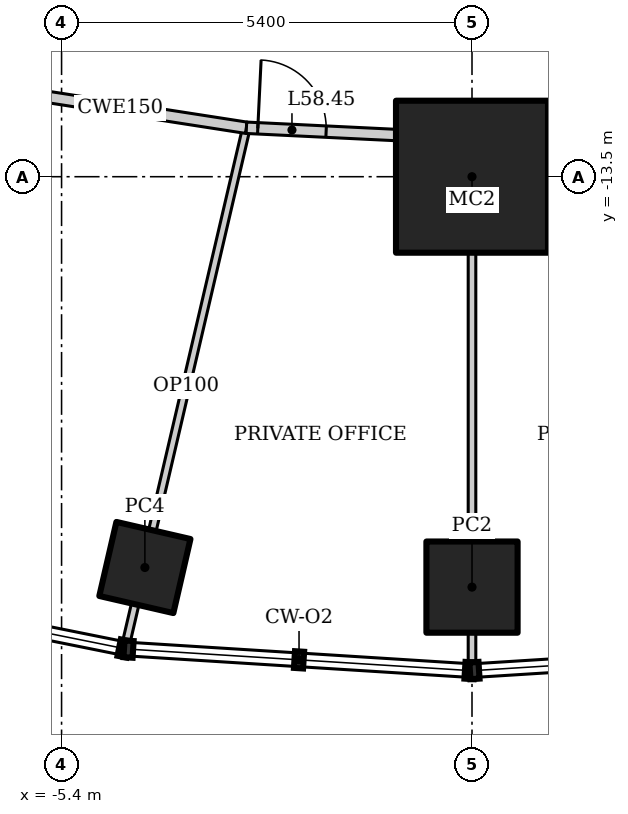
"""IFC4 building model, lengths in metres.
Left out: names, types, materials, properties, quantities, classifications, styles, units other than length and angle.
Written with IfcOpenShell. Run it as: python <this file> out.ifc"""

import sys

from ifc_helpers import new_model, si_unit, direction, frame, frame_2d, origin, origin_2d, place, context, subcontext, project, spatial, rectangle, hollow_rectangle, extrude, element, fill, save


model = new_model("IFC4")
c1 = context("Model", 3, precision=1e-05, world=origin(), true_north=direction((0.0, 1.0)))
c2 = subcontext(c1, "Body", "Model", "MODEL_VIEW")
j1 = project(units=[si_unit("LENGTHUNIT", "METRE"), si_unit("PLANEANGLEUNIT", "RADIAN")], contexts=[c1])
p1 = place(None, origin())
s1 = spatial("IfcSite", under=j1, at=p1, CompositionType="ELEMENT")
p2 = place(p1, origin())
s2 = spatial("IfcBuilding", under=s1, at=p2, CompositionType="ELEMENT")
p3 = place(p2, frame((0.0, 0.0, 249.4)))
s3 = spatial("IfcBuildingStorey", under=s2, at=p3, CompositionType="ELEMENT", Elevation=249.4)
p4 = place(p3, frame((0.0, -13.5, 0.0), z_axis=(0.0, 0.0, 1.0), x_axis=(1.0, 0.0, 0.0)))
e1 = element("IfcColumn", 1, at=p4, inside=s3, PredefinedType="COLUMN", context=c2, shape_type="SweptSolid", body=[
    extrude(hollow_rectangle(XDim=2.0, YDim=2.0, WallThickness=0.17, at=origin_2d()), origin(), (0.0, 0.0, 1.0), 4.2),
])
p5 = place(p3, frame((-4.304, -18.642, 0.0), z_axis=(0.0, 0.0, 1.0), x_axis=(0.224951054344, 0.974370064785, 0.0)))
e2 = element("IfcColumn", 2, at=p5, inside=s3, PredefinedType="COLUMN", context=c2, shape_type="SweptSolid", body=[
    extrude(hollow_rectangle(XDim=1.0, YDim=1.0, WallThickness=0.08, at=origin_2d()), origin(), (0.0, 0.0, 1.0), 4.2),
])
p6 = place(p3, frame((0.0, -18.9, 0.0), z_axis=(0.0, 0.0, 1.0), x_axis=(1.0, 0.0, 0.0)))
e3 = element("IfcColumn", 3, at=p6, inside=s3, PredefinedType="COLUMN", context=c2, shape_type="SweptSolid", body=[
    extrude(hollow_rectangle(XDim=1.2, YDim=1.2, WallThickness=0.1, at=origin_2d()), origin(), (0.0, 0.0, 1.0), 4.2),
])
p7 = place(p3, frame((-4.556, -19.657, 0.0), z_axis=(0.0, 0.0, 1.0), x_axis=(0.22733791689, 0.973815933092, 0.0)))
e4 = element("IfcWall", 4, at=p7, inside=s3, PredefinedType="PARTITIONING", context=c2, shape_type="SweptSolid", body=[
    extrude(rectangle(XDim=6.984, YDim=0.1, at=frame_2d((3.492, 0.0))), origin(), (0.0, 0.0, 1.0), 3.293),
])
p8 = place(p3, frame((0.0, -19.945, 0.0), z_axis=(0.0, 0.0, 1.0), x_axis=(0.0, 1.0, 0.0)))
e5 = element("IfcWall", 5, at=p8, inside=s3, PredefinedType="PARTITIONING", context=c2, shape_type="SweptSolid", body=[
    extrude(rectangle(XDim=6.945, YDim=0.1, at=frame_2d((3.472, 0.0))), origin(), (0.0, 0.0, 1.0), 3.644),
])
p9 = place(p3, frame((-6.288, -12.341, 0.0), z_axis=(0.0, 0.0, 1.0), x_axis=(0.988174283057, -0.153334882869, 0.0)))
e6 = element("IfcWall", 6, at=p9, inside=s3, PredefinedType="PARTITIONING", context=c2, shape_type="SweptSolid", body=[
    extrude(rectangle(XDim=3.36, YDim=0.15, at=frame_2d((1.68, 0.0))), origin(), (0.0, 0.0, 1.0), 4.05),
])
p10 = place(p3, frame((-2.968, -12.856, 0.0), z_axis=(0.0, 0.0, 1.0), x_axis=(0.998824412818, -0.04847465687, 0.0)))
e7 = element("IfcWall", 7, at=p10, inside=s3, PredefinedType="PARTITIONING", context=c2, shape_type="SweptSolid", body=[
    extrude(rectangle(XDim=2.971, YDim=0.15, at=frame_2d((1.486, 0.0))), origin(), (0.0, 0.0, 1.0), 4.05),
])
p11 = place(p10, frame((0.15, 0.0, 0.0)))
e8 = element("IfcOpeningElement", 8, at=p11, cuts=e7, PredefinedType="OPENING", context=c2, shape_type="SweptSolid", body=[
    extrude(rectangle(XDim=0.9, YDim=2.1, at=frame_2d((0.45, 1.05))), frame((0.0, 0.085, 0.0), z_axis=(0.0, -1.0, 0.0), x_axis=(1.0, 0.0, 0.0)), (0.0, 0.0, 1.0), 0.17),
])
p12 = place(p3, frame((0.0, -13.0, 0.0), z_axis=(0.0, 0.0, 1.0), x_axis=(0.998824412818, 0.04847465687, 0.0)))
e9 = element("IfcWall", 9, at=p12, inside=s3, PredefinedType="PARTITIONING", context=c2, shape_type="SweptSolid", body=[
    extrude(rectangle(XDim=2.971, YDim=0.15, at=frame_2d((1.486, 0.0))), origin(), (0.0, 0.0, 1.0), 4.05),
])
p13 = place(p12, frame((1.921, 0.0, 0.0)))
e10 = element("IfcOpeningElement", 10, at=p13, cuts=e9, PredefinedType="OPENING", context=c2, shape_type="SweptSolid", body=[
    extrude(rectangle(XDim=0.9, YDim=2.1, at=frame_2d((0.45, 1.05))), frame((0.0, 0.085, 0.0), z_axis=(0.0, -1.0, 0.0), x_axis=(1.0, 0.0, 0.0)), (0.0, 0.0, 1.0), 0.17),
])
p14 = place(p11, origin())
e11 = element("IfcDoor", 11, at=p14, inside=s3, OperationType="SINGLE_SWING_LEFT", PredefinedType="DOOR", context=c2, shape_type="SweptSolid", body=[
    extrude(rectangle(XDim=0.9, YDim=2.1, at=frame_2d((0.45, 1.05))), frame((0.0, 0.025, 0.0), z_axis=(0.0, -1.0, 0.0), x_axis=(1.0, 0.0, 0.0)), (0.0, 0.0, 1.0), 0.05),
])
fill(e8, e11)
save(model, sys.argv[1])
